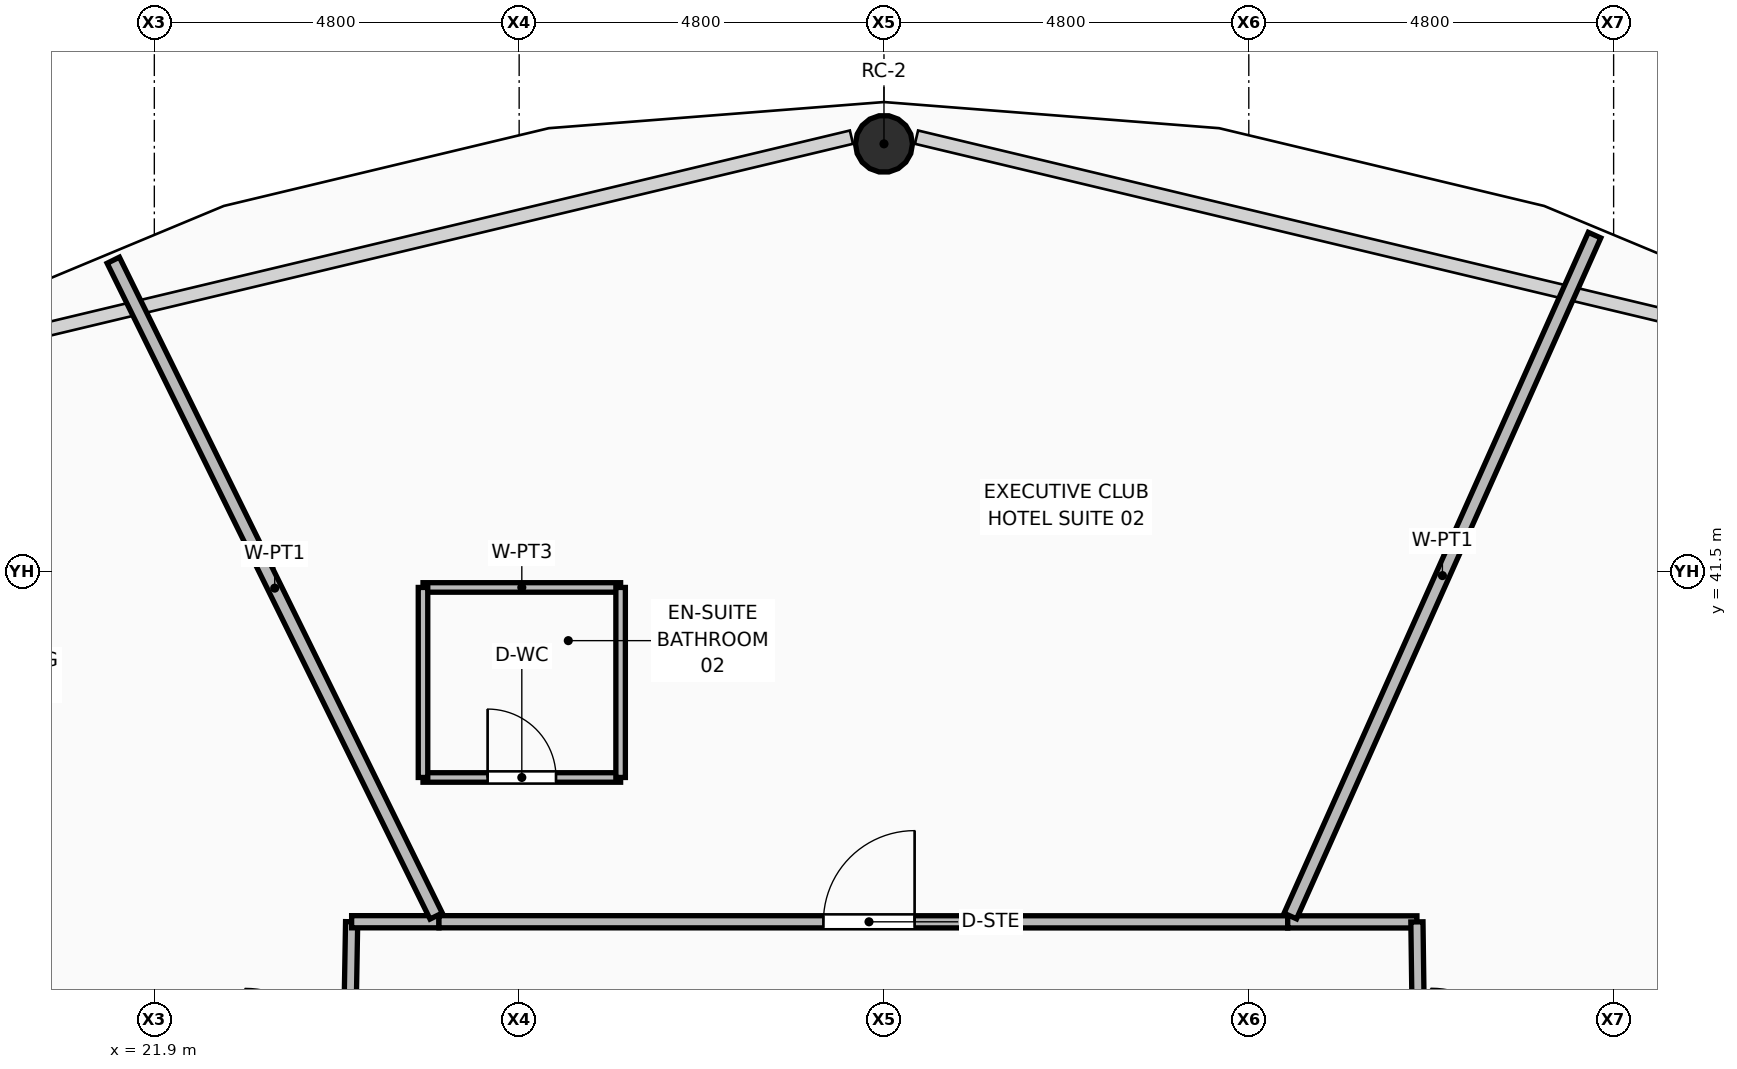
"""IFC4 building model, lengths in metres.
Left out: names, types, materials, properties, quantities, classifications, styles, units other than length and angle.
Written with IfcOpenShell. Run it as: python <this file> out.ifc"""

import sys

from ifc_helpers import new_model, si_unit, direction, frame, frame_2d, origin, origin_2d, place, context, subcontext, project, spatial, rectangle, hollow_circle, extrude, element, fill, save


model = new_model("IFC4")
c1 = context("Model", 3, precision=1e-05, world=origin(), true_north=direction((0.0, 1.0)))
c2 = subcontext(c1, "Body", "Model", "MODEL_VIEW")
j1 = project(units=[si_unit("LENGTHUNIT", "METRE"), si_unit("PLANEANGLEUNIT", "RADIAN")], contexts=[c1])
p1 = place(None, origin())
s1 = spatial("IfcSite", under=j1, at=p1, CompositionType="ELEMENT")
p2 = place(p1, origin())
s2 = spatial("IfcBuilding", under=s1, at=p2, CompositionType="ELEMENT")
p3 = place(p2, frame((0.0, 0.0, 145.95)))
s3 = spatial("IfcBuildingStorey", under=s2, at=p3, CompositionType="ELEMENT", Elevation=145.95)
p4 = place(p3, frame((31.5, 47.124, 0.0), z_axis=(0.0, -0.015384898463, 0.999881645446), x_axis=(1.0, 0.0, 0.0)))
e1 = element("IfcColumn", 1, at=p4, inside=s3, PredefinedType="COLUMN", context=c2, shape_type="SweptSolid", body=[
    extrude(hollow_circle(Radius=0.375, WallThickness=0.035, at=origin_2d()), origin(), (0.0, 0.0, 1.0), 3.571),
])
p5 = place(p3, frame((24.46, 34.815, 0.0), z_axis=(0.0, 0.0, 1.0), x_axis=(0.0174111737, 0.999848414026, 0.0)))
e2 = element("IfcWall", 2, at=p5, inside=s3, PredefinedType="PARTITIONING", context=c2, shape_type="SweptSolid", body=[
    extrude(rectangle(XDim=2.075, YDim=0.16, at=frame_2d((1.038, 0.0))), origin(), (0.0, 0.0, 1.0), 3.55),
])
p6 = place(p3, frame((24.496, 36.89, 0.0), z_axis=(0.0, 0.0, 1.0), x_axis=(1.0, 0.0, 0.0)))
e3 = element("IfcWall", 3, at=p6, inside=s3, PredefinedType="PARTITIONING", context=c2, shape_type="SweptSolid", body=[
    extrude(rectangle(XDim=1.149, YDim=0.16, at=frame_2d((0.574, 0.0))), origin(), (0.0, 0.0, 1.0), 3.55),
])
p7 = place(p3, frame((25.645, 36.89, 0.0), z_axis=(0.0, 0.0, 1.0), x_axis=(0.999999984705, -0.000174901615, 0.0)))
e4 = element("IfcWall", 4, at=p7, inside=s3, PredefinedType="PARTITIONING", context=c2, shape_type="SweptSolid", body=[
    extrude(rectangle(XDim=11.167, YDim=0.16, at=frame_2d((5.583, 0.0))), origin(), (0.0, 0.0, 1.0), 3.006),
])
p8 = place(p7, frame((5.058, 0.0, 0.0)))
e5 = element("IfcOpeningElement", 5, at=p8, cuts=e4, PredefinedType="OPENING", context=c2, shape_type="SweptSolid", body=[
    extrude(rectangle(XDim=1.2, YDim=2.1, at=frame_2d((0.6, 1.05))), frame((0.0, 0.09, 0.0), z_axis=(0.0, -1.0, 0.0), x_axis=(1.0, 0.0, 0.0)), (0.0, 0.0, 1.0), 0.18),
])
p9 = place(p3, frame((36.812, 36.888, 0.0), z_axis=(0.0, 0.0, 1.0), x_axis=(1.0, 0.0, 0.0)))
e6 = element("IfcWall", 6, at=p9, inside=s3, PredefinedType="PARTITIONING", context=c2, shape_type="SweptSolid", body=[
    extrude(rectangle(XDim=1.7, YDim=0.16, at=frame_2d((0.85, 0.0))), origin(), (0.0, 0.0, 1.0), 3.55),
])
p10 = place(p3, frame((38.512, 36.888, 0.0), z_axis=(0.0, 0.0, 1.0), x_axis=(0.013542510192, -0.999908296004, 0.0)))
e7 = element("IfcWall", 7, at=p10, inside=s3, PredefinedType="PARTITIONING", context=c2, shape_type="SweptSolid", body=[
    extrude(rectangle(XDim=2.073, YDim=0.16, at=frame_2d((1.037, 0.0))), origin(), (0.0, 0.0, 1.0), 3.55),
])
p11 = place(p3, frame((36.846, 36.965, 0.0), z_axis=(0.0, 0.0, 1.0), x_axis=(0.407996107771, 0.91298366691, 0.0)))
e8 = element("IfcWall", 8, at=p11, inside=s3, PredefinedType="PARTITIONING", context=c2, shape_type="SweptSolid", body=[
    extrude(rectangle(XDim=9.812, YDim=0.18, at=frame_2d((4.906, 0.0))), origin(), (0.0, 0.0, 1.0), 2.852),
])
p12 = place(p3, frame((25.608, 36.965, 0.0), z_axis=(0.0, 0.0, 1.0), x_axis=(-0.441701315399, 0.8971621637, 0.0)))
e9 = element("IfcWall", 9, at=p12, inside=s3, PredefinedType="PARTITIONING", context=c2, shape_type="SweptSolid", body=[
    extrude(rectangle(XDim=9.617, YDim=0.18, at=frame_2d((4.809, 0.0))), origin(), (0.0, 0.0, 1.0), 2.852),
])
p13 = place(p3, frame((25.435, 38.788, 0.0), z_axis=(0.0, 0.0, 1.0), x_axis=(1.0, 0.0, 0.0)))
e10 = element("IfcWall", 10, at=p13, inside=s3, PredefinedType="PARTITIONING", context=c2, shape_type="SweptSolid", body=[
    extrude(rectangle(XDim=2.6, YDim=0.125, at=frame_2d((1.3, 0.0))), origin(), (0.0, 0.0, 1.0), 3.55),
])
p14 = place(p13, frame((0.85, 0.0, 0.0)))
e11 = element("IfcOpeningElement", 11, at=p14, cuts=e10, PredefinedType="OPENING", context=c2, shape_type="SweptSolid", body=[
    extrude(rectangle(XDim=0.9, YDim=2.1, at=frame_2d((0.45, 1.05))), frame((0.0, 0.073, 0.0), z_axis=(0.0, -1.0, 0.0), x_axis=(1.0, 0.0, 0.0)), (0.0, 0.0, 1.0), 0.145),
])
p15 = place(p3, frame((25.435, 41.288, 0.0), z_axis=(0.0, 0.0, 1.0), x_axis=(1.0, 0.0, 0.0)))
e12 = element("IfcWall", 12, at=p15, inside=s3, PredefinedType="PARTITIONING", context=c2, shape_type="SweptSolid", body=[
    extrude(rectangle(XDim=2.6, YDim=0.125, at=frame_2d((1.3, 0.0))), origin(), (0.0, 0.0, 1.0), 3.55),
])
for number, where, z_axis, x_axis in (
    (13, (25.435, 38.788, 0.0), (0.0, 0.0, 1.0), (0.0, 1.0, 0.0)),
    (14, (28.035, 38.788, 0.0), (0.0, 0.0, 1.0), (0.0, 1.0, 0.0)),
):
    element("IfcWall", number, at=place(p3, frame(where, z_axis=z_axis, x_axis=x_axis)), inside=s3, PredefinedType="PARTITIONING", context=c2, shape_type="SweptSolid", body=[
        extrude(rectangle(XDim=2.5, YDim=0.125, at=frame_2d((1.25, 0.0))), origin(), (0.0, 0.0, 1.0), 3.55),
    ])
p16 = place(p14, origin())
e15 = element("IfcDoor", 15, at=p16, inside=s3, OperationType="SINGLE_SWING_LEFT", PredefinedType="DOOR", context=c2, shape_type="SweptSolid", body=[
    extrude(rectangle(XDim=0.9, YDim=2.1, at=frame_2d((0.45, 1.05))), frame((0.0, 0.025, 0.0), z_axis=(0.0, -1.0, 0.0), x_axis=(1.0, 0.0, 0.0)), (0.0, 0.0, 1.0), 0.05),
])
fill(e11, e15)
p17 = place(p8, origin())
e16 = element("IfcDoor", 16, at=p17, inside=s3, OperationType="SINGLE_SWING_RIGHT", PredefinedType="DOOR", context=c2, shape_type="SweptSolid", body=[
    extrude(rectangle(XDim=1.2, YDim=2.1, at=frame_2d((0.6, 1.05))), frame((0.0, 0.025, 0.0), z_axis=(0.0, -1.0, 0.0), x_axis=(1.0, 0.0, 0.0)), (0.0, 0.0, 1.0), 0.05),
])
fill(e5, e16)
save(model, sys.argv[1])
